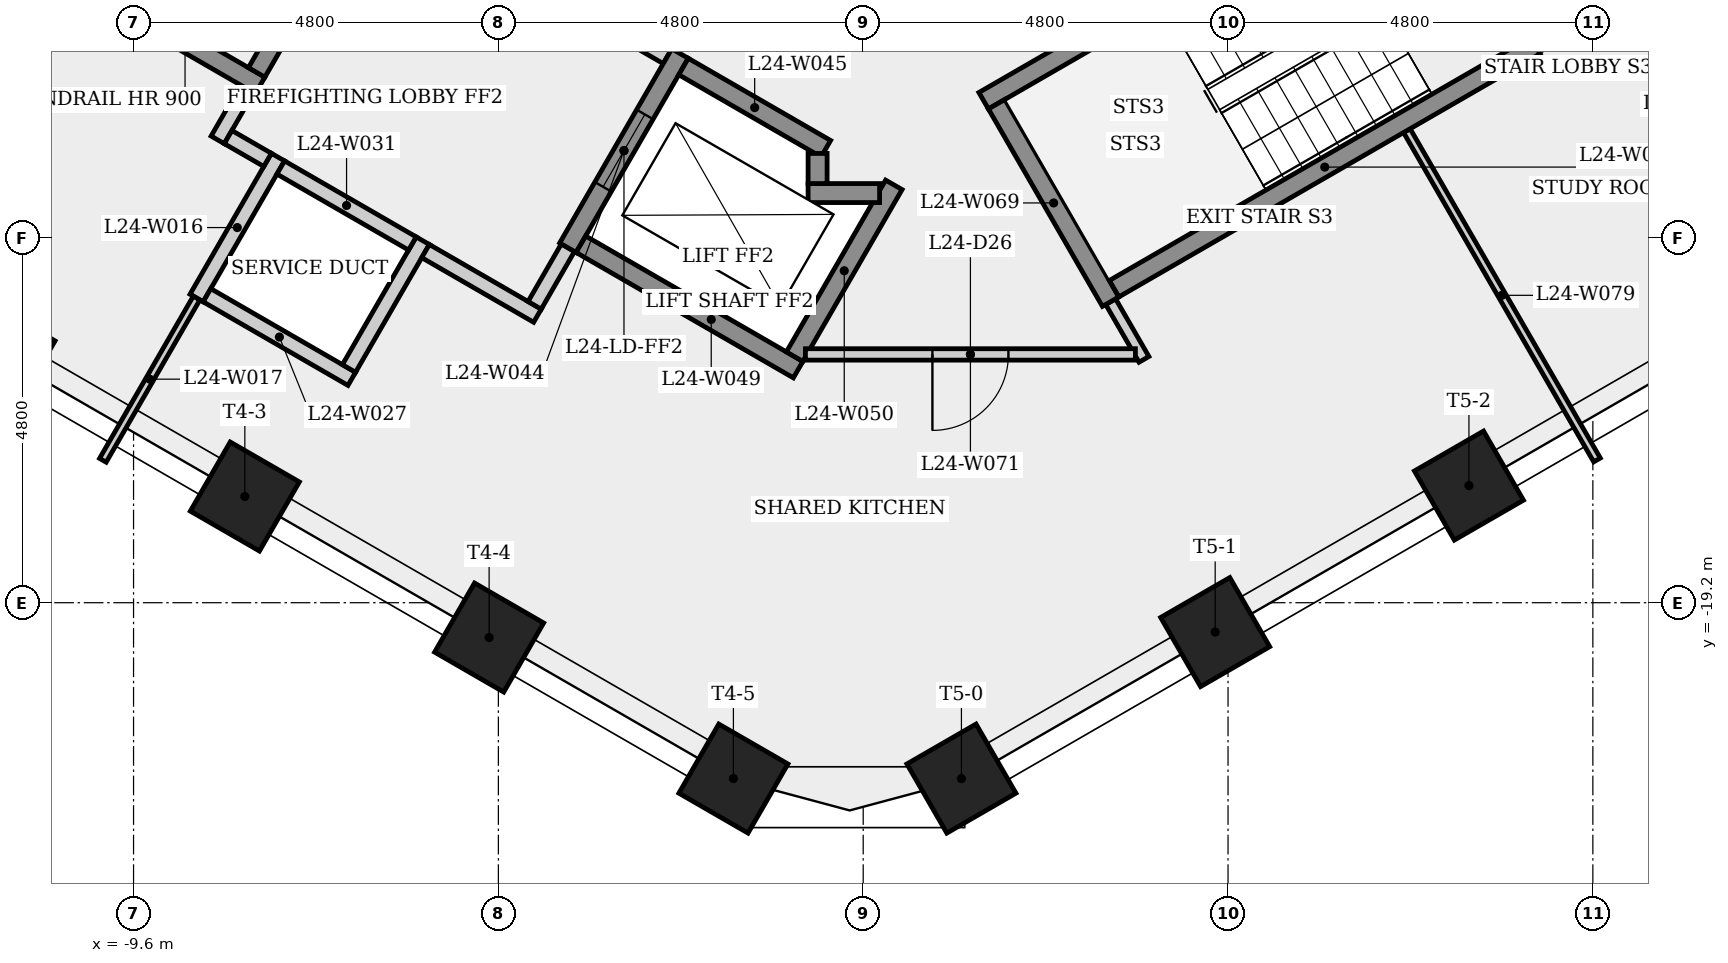
"""IFC4 building model, lengths in metres.
Left out: names, types, materials, properties, quantities, classifications, styles, units other than length and angle.
Written with IfcOpenShell. Run it as: python <this file> out.ifc"""

import sys

from ifc_helpers import new_model, si_unit, direction, frame, frame_2d, origin, origin_2d, place, context, subcontext, project, spatial, rectangle, extrude, element, fill, save


model = new_model("IFC4")
c1 = context("Model", 3, precision=1e-05, world=origin(), true_north=direction((0.0, 1.0)))
c2 = subcontext(c1, "Body", "Model", "MODEL_VIEW")
j1 = project(units=[si_unit("LENGTHUNIT", "METRE"), si_unit("PLANEANGLEUNIT", "RADIAN")], contexts=[c1])
p1 = place(None, origin())
s1 = spatial("IfcSite", under=j1, at=p1, CompositionType="ELEMENT")
p2 = place(p1, origin())
s2 = spatial("IfcBuilding", under=s1, at=p2, CompositionType="ELEMENT")
p3 = place(p2, frame((0.0, 0.0, 93.3)))
s3 = spatial("IfcBuildingStorey", under=s2, at=p3, CompositionType="ELEMENT", Elevation=93.3)
for number, where, z_axis, x_axis in (
    (1, (-11.35, -15.947, 0.0), (0.0, 0.0, 1.0), (-0.5, -0.866, 0.0)),
    (2, (-8.136, -17.803, 0.0), (0.0, 0.0, 1.0), (-0.5, -0.866, 0.0)),
    (3, (-4.922, -19.658, 0.0), (0.0, 0.0, 1.0), (-0.5, -0.866, 0.0)),
    (4, (-1.708, -21.514, 0.0), (0.0, 0.0, 1.0), (-0.5, -0.866, 0.0)),
    (5, (1.292, -21.514, 0.0), (0.0, 0.0, 1.0), (0.5, -0.866, 0.0)),
    (6, (4.631, -19.586, 0.0), (0.0, 0.0, 1.0), (0.5, -0.866, 0.0)),
    (7, (7.969, -17.659, 0.0), (0.0, 0.0, 1.0), (0.5, -0.866, 0.0)),
):
    element("IfcColumn", number, at=place(p3, frame(where, z_axis=z_axis, x_axis=x_axis)), inside=s3, PredefinedType="COLUMN", context=c2, shape_type="SweptSolid", body=[
        extrude(rectangle(XDim=1.05, YDim=1.05, at=origin_2d()), origin(), (0.0, 0.0, 1.0), 3.4),
    ])
p4 = place(p3, frame((-8.771, -15.191, 0.0), z_axis=(0.0, 0.0, 1.0), x_axis=(0.500051491514, 0.865995673104, 0.0)))
e8 = element("IfcWall", 8, at=p4, inside=s3, PredefinedType="PLUMBINGWALL", context=c2, shape_type="SweptSolid", body=[
    extrude(rectangle(XDim=2.141, YDim=0.2, at=frame_2d((1.07, 0.0))), origin(), (0.0, 0.0, 1.0), 3.05),
])
p5 = place(p3, frame((-8.771, -15.191, 0.0), z_axis=(0.0, 0.0, 1.0), x_axis=(-0.500036725936, -0.866004199017, 0.0)))
e9 = element("IfcWall", 9, at=p5, inside=s3, PredefinedType="PARTITIONING", context=c2, shape_type="SweptSolid", body=[
    extrude(rectangle(XDim=2.466, YDim=0.1, at=frame_2d((1.233, 0.0))), origin(), (0.0, 0.0, 1.0), 3.05),
])
p6 = place(p3, frame((-8.493, -13.11, 0.0), z_axis=(0.0, 0.0, 1.0), x_axis=(0.500067724834, 0.865986299303, 0.0)))
e10 = element("IfcWall", 10, at=p6, inside=s3, PredefinedType="PARTITIONING", context=c2, shape_type="SweptSolid", body=[
    extrude(rectangle(XDim=0.775, YDim=0.2, at=frame_2d((0.388, 0.0))), origin(), (0.0, 0.0, 1.0), 3.05),
])
p7 = place(p3, frame((-7.935, -12.393, 0.0), z_axis=(0.0, 0.0, 1.0), x_axis=(-0.866025499775, 0.499999833739, 0.0)))
e11 = element("IfcWall", 11, at=p7, inside=s3, PredefinedType="SHEAR", context=c2, shape_type="SweptSolid", body=[
    extrude(rectangle(XDim=6.4, YDim=0.25, at=frame_2d((3.2, 0.0))), origin(), (0.0, 0.0, 1.0), 3.05),
])
p8 = place(p3, frame((-7.836, -13.373, 0.0), z_axis=(0.0, 0.0, 1.0), x_axis=(-0.866232998003, 0.499640263761, 0.0)))
e12 = element("IfcWall", 12, at=p8, inside=s3, PredefinedType="PARTITIONING", context=c2, shape_type="SweptSolid", body=[
    extrude(rectangle(XDim=0.6, YDim=0.2, at=frame_2d((0.3, 0.0))), origin(), (0.0, 0.0, 1.0), 3.05),
])
p9 = place(p3, frame((-6.729, -16.254, 0.0), z_axis=(0.0, 0.0, 1.0), x_axis=(-0.86598042715, 0.500077893725, 0.0)))
e13 = element("IfcWall", 13, at=p9, inside=s3, PredefinedType="PLUMBINGWALL", context=c2, shape_type="SweptSolid", body=[
    extrude(rectangle(XDim=2.2, YDim=0.2, at=frame_2d((1.1, 0.0))), origin(), (0.0, 0.0, 1.0), 3.05),
])
p10 = place(p3, frame((-6.605, -9.841, 0.0), z_axis=(0.0, 0.0, 1.0), x_axis=(-0.499996545922, -0.866027397988, 0.0)))
e14 = element("IfcWall", 14, at=p10, inside=s3, PredefinedType="SHEAR", context=c2, shape_type="SweptSolid", body=[
    extrude(rectangle(XDim=2.75, YDim=0.25, at=frame_2d((1.375, 0.0))), origin(), (0.0, 0.0, 1.0), 3.05),
])
p11 = place(p10, frame((0.875, 0.0, 0.0)))
e15 = element("IfcOpeningElement", 15, at=p11, cuts=e14, PredefinedType="OPENING", context=c2, shape_type="SweptSolid", body=[
    extrude(rectangle(XDim=1.0, YDim=2.1, at=frame_2d((0.5, 1.05))), frame((0.0, 0.135, 0.0), z_axis=(0.0, -1.0, 0.0), x_axis=(1.0, 0.0, 0.0)), (0.0, 0.0, 1.0), 0.27),
])
p12 = place(p3, frame((-6.435, -9.795, 0.0), z_axis=(0.0, 0.0, 1.0), x_axis=(0.866012907634, -0.500021643343, 0.0)))
e16 = element("IfcWall", 16, at=p12, inside=s3, PredefinedType="PARTITIONING", context=c2, shape_type="SweptSolid", body=[
    extrude(rectangle(XDim=4.45, YDim=0.2, at=frame_2d((2.225, 0.0))), origin(), (0.0, 0.0, 1.0), 3.05),
])
p13 = place(p12, frame((1.675, 0.0, 0.0)))
e17 = element("IfcOpeningElement", 17, at=p13, cuts=e16, PredefinedType="OPENING", context=c2, shape_type="SweptSolid", body=[
    extrude(rectangle(XDim=1.1, YDim=2.1, at=frame_2d((0.55, 1.05))), frame((0.0, 0.11, 0.0), z_axis=(0.0, -1.0, 0.0), x_axis=(1.0, 0.0, 0.0)), (0.0, 0.0, 1.0), 0.22),
])
p14 = place(p3, frame((-5.795, -14.437, 0.0), z_axis=(0.0, 0.0, 1.0), x_axis=(-0.500034525977, -0.866005469285, 0.0)))
e18 = element("IfcWall", 18, at=p14, inside=s3, PredefinedType="PLUMBINGWALL", context=c2, shape_type="SweptSolid", body=[
    extrude(rectangle(XDim=1.941, YDim=0.2, at=frame_2d((0.971, 0.0))), origin(), (0.0, 0.0, 1.0), 3.05),
])
p15 = place(p3, frame((-5.931, -14.473, 0.0), z_axis=(0.0, 0.0, 1.0), x_axis=(-0.866041268327, 0.499972520799, 0.0)))
e19 = element("IfcWall", 19, at=p15, inside=s3, PredefinedType="PLUMBINGWALL", context=c2, shape_type="SweptSolid", body=[
    extrude(rectangle(XDim=2.0, YDim=0.2, at=frame_2d((1.0, 0.0))), origin(), (0.0, 0.0, 1.0), 3.05),
])
p16 = place(p3, frame((-4.286, -15.423, 0.0), z_axis=(0.0, 0.0, 1.0), x_axis=(-0.866025371046, 0.500000056704, 0.0)))
e20 = element("IfcWall", 20, at=p16, inside=s3, PredefinedType="PARTITIONING", context=c2, shape_type="SweptSolid", body=[
    extrude(rectangle(XDim=1.7, YDim=0.2, at=frame_2d((0.85, 0.0))), origin(), (0.0, 0.0, 1.0), 3.05),
])
p17 = place(p3, frame((-3.885, -14.529, 0.0), z_axis=(0.0, 0.0, 1.0), x_axis=(-0.499859285417, -0.866106630146, 0.0)))
e21 = element("IfcWall", 21, at=p17, inside=s3, PredefinedType="PARTITIONING", context=c2, shape_type="SweptSolid", body=[
    extrude(rectangle(XDim=0.875, YDim=0.2, at=frame_2d((0.438, 0.0))), origin(), (0.0, 0.0, 1.0), 3.05),
])
p18 = place(p3, frame((-2.41, -11.974, 0.0), z_axis=(0.0, 0.0, 1.0), x_axis=(-0.500001826776, -0.866024349092, 0.0)))
e22 = element("IfcWall", 22, at=p18, inside=s3, PredefinedType="SHEAR", context=c2, shape_type="SweptSolid", body=[
    extrude(rectangle(XDim=2.95, YDim=0.25, at=frame_2d((1.475, 0.0))), origin(), (0.0, 0.0, 1.0), 3.05),
])
p19 = place(p18, frame((0.925, 0.0, 0.0)))
e23 = element("IfcOpeningElement", 23, at=p19, cuts=e22, PredefinedType="OPENING", context=c2, shape_type="SweptSolid", body=[
    extrude(rectangle(XDim=1.1, YDim=2.1, at=frame_2d((0.55, 1.05))), frame((0.0, 0.135, 0.0), z_axis=(0.0, -1.0, 0.0), x_axis=(1.0, 0.0, 0.0)), (0.0, 0.0, 1.0), 0.27),
])
p20 = place(p3, frame((-2.364, -12.145, 0.0), z_axis=(0.0, 0.0, 1.0), x_axis=(0.86603892542, -0.499976579108, 0.0)))
e24 = element("IfcWall", 24, at=p20, inside=s3, PredefinedType="SHEAR", context=c2, shape_type="SweptSolid", body=[
    extrude(rectangle(XDim=2.162, YDim=0.25, at=frame_2d((1.081, 0.0))), origin(), (0.0, 0.0, 1.0), 3.05),
])
p21 = place(p3, frame((-0.856, -16.133, 0.0), z_axis=(0.0, 0.0, 1.0), x_axis=(-0.866021716278, 0.500006386895, 0.0)))
e25 = element("IfcWall", 25, at=p21, inside=s3, PredefinedType="SHEAR", context=c2, shape_type="SweptSolid", body=[
    extrude(rectangle(XDim=3.3, YDim=0.25, at=frame_2d((1.65, 0.0))), origin(), (0.0, 0.0, 1.0), 3.05),
])
p22 = place(p3, frame((-0.902, -15.962, 0.0), z_axis=(0.0, 0.0, 1.0), x_axis=(0.499981517636, 0.866036074319, 0.0)))
e26 = element("IfcWall", 26, at=p22, inside=s3, PredefinedType="SHEAR", context=c2, shape_type="SweptSolid", body=[
    extrude(rectangle(XDim=2.61, YDim=0.25, at=frame_2d((1.305, 0.0))), origin(), (0.0, 0.0, 1.0), 3.05),
])
p23 = place(p3, frame((-0.725, -13.81, 0.0), z_axis=(0.0, 0.0, 1.0), x_axis=(1.0, 0.0, 0.0)))
e27 = element("IfcWall", 27, at=p23, inside=s3, PredefinedType="SHEAR", context=c2, shape_type="SweptSolid", body=[
    extrude(rectangle(XDim=0.941, YDim=0.25, at=frame_2d((0.47, 0.0))), origin(), (0.0, 0.0, 1.0), 3.4),
])
p24 = place(p3, frame((-0.6, -13.289, 0.0), z_axis=(0.0, 0.0, 1.0), x_axis=(0.0, -1.0, 0.0)))
e28 = element("IfcWall", 28, at=p24, inside=s3, PredefinedType="SHEAR", context=c2, shape_type="SweptSolid", body=[
    extrude(rectangle(XDim=0.396, YDim=0.25, at=frame_2d((0.198, 0.0))), origin(), (0.0, 0.0, 1.0), 3.4),
])
p25 = place(p3, frame((1.585, -12.595, 0.0), z_axis=(0.0, 0.0, 1.0), x_axis=(0.866036417653, 0.499980922934, 0.0)))
e29 = element("IfcWall", 29, at=p25, inside=s3, PredefinedType="SHEAR", context=c2, shape_type="SweptSolid", body=[
    extrude(rectangle(XDim=6.65, YDim=0.25, at=frame_2d((3.325, 0.0))), origin(), (0.0, 0.0, 1.0), 3.05),
])
p26 = place(p25, frame((5.275, 0.0, 0.0)))
e30 = element("IfcOpeningElement", 30, at=p26, cuts=e29, PredefinedType="OPENING", context=c2, shape_type="SweptSolid", body=[
    extrude(rectangle(XDim=1.0, YDim=2.1, at=frame_2d((0.5, 1.05))), frame((0.0, 0.135, 0.0), z_axis=(0.0, -1.0, 0.0), x_axis=(1.0, 0.0, 0.0)), (0.0, 0.0, 1.0), 0.27),
])
p27 = place(p3, frame((3.256, -15.239, 0.0), z_axis=(0.0, 0.0, 1.0), x_axis=(0.499883169583, -0.866092845351, 0.0)))
e31 = element("IfcWall", 31, at=p27, inside=s3, PredefinedType="PARTITIONING", context=c2, shape_type="SweptSolid", body=[
    extrude(rectangle(XDim=0.877, YDim=0.15, at=frame_2d((0.438, 0.0))), origin(), (0.0, 0.0, 1.0), 3.05),
])
p28 = place(p3, frame((3.256, -15.239, 0.0), z_axis=(0.0, 0.0, 1.0), x_axis=(-0.50002537861, 0.866010750942, 0.0)))
e32 = element("IfcWall", 32, at=p28, inside=s3, PredefinedType="SHEAR", context=c2, shape_type="SweptSolid", body=[
    extrude(rectangle(XDim=3.0, YDim=0.25, at=frame_2d((1.5, 0.0))), origin(), (0.0, 0.0, 1.0), 3.05),
])
p29 = place(p3, frame((3.581, -15.933, 0.0), z_axis=(0.0, 0.0, 1.0), x_axis=(-1.0, 0.0, 0.0)))
e33 = element("IfcWall", 33, at=p29, inside=s3, PredefinedType="PARTITIONING", context=c2, shape_type="SweptSolid", body=[
    extrude(rectangle(XDim=4.341, YDim=0.15, at=frame_2d((2.171, 0.0))), origin(), (0.0, 0.0, 1.0), 3.05),
])
p30 = place(p29, frame((1.671, 0.0, 0.0)))
e34 = element("IfcOpeningElement", 34, at=p30, cuts=e33, PredefinedType="OPENING", context=c2, shape_type="SweptSolid", body=[
    extrude(rectangle(XDim=1.0, YDim=2.1, at=frame_2d((0.5, 1.05))), frame((0.0, 0.085, 0.0), z_axis=(0.0, -1.0, 0.0), x_axis=(1.0, 0.0, 0.0)), (0.0, 0.0, 1.0), 0.17),
])
p31 = place(p3, frame((7.153, -12.989, 0.0), z_axis=(0.0, 0.0, 1.0), x_axis=(0.500022324899, -0.866012514114, 0.0)))
e35 = element("IfcWall", 35, at=p31, inside=s3, PredefinedType="PARTITIONING", context=c2, shape_type="SweptSolid", body=[
    extrude(rectangle(XDim=5.004, YDim=0.1, at=frame_2d((2.502, 0.0))), origin(), (0.0, 0.0, 1.0), 3.05),
])
p32 = place(p3, frame((3.301, -15.068, 0.0), z_axis=(0.0, 0.0, 1.0), x_axis=(0.866035036182, 0.499983315828, 0.0)))
e36 = element("IfcWall", 36, at=p32, inside=s3, PredefinedType="SHEAR", context=c2, shape_type="SweptSolid", body=[
    extrude(rectangle(XDim=6.4, YDim=0.25, at=frame_2d((3.2, 0.0))), origin(), (0.0, 0.0, 1.0), 3.05),
])
p33 = place(p3, frame((10.901, -10.681, 0.0), z_axis=(0.0, 0.0, 1.0), x_axis=(-0.866007538022, -0.500030943131, 0.0)))
e37 = element("IfcWall", 37, at=p33, inside=s3, PredefinedType="PARTITIONING", context=c2, shape_type="SweptSolid", body=[
    extrude(rectangle(XDim=2.375, YDim=0.2, at=frame_2d((1.188, 0.0))), origin(), (0.0, 0.0, 1.0), 3.05),
])
p34 = place(p19, origin())
e38 = element("IfcDoor", 38, at=p34, inside=s3, OperationType="SLIDING_TO_LEFT", PredefinedType="DOOR", context=c2, shape_type="SweptSolid", body=[
    extrude(rectangle(XDim=1.1, YDim=2.1, at=frame_2d((0.55, 1.05))), frame((0.0, 0.025, 0.0), z_axis=(0.0, -1.0, 0.0), x_axis=(1.0, 0.0, 0.0)), (0.0, 0.0, 1.0), 0.05),
])
fill(e23, e38)
p35 = place(p30, origin())
e39 = element("IfcDoor", 39, at=p35, inside=s3, OperationType="SINGLE_SWING_RIGHT", PredefinedType="DOOR", context=c2, shape_type="SweptSolid", body=[
    extrude(rectangle(XDim=1.0, YDim=2.1, at=frame_2d((0.5, 1.05))), frame((0.0, 0.025, 0.0), z_axis=(0.0, -1.0, 0.0), x_axis=(1.0, 0.0, 0.0)), (0.0, 0.0, 1.0), 0.05),
])
fill(e34, e39)
save(model, sys.argv[1])
